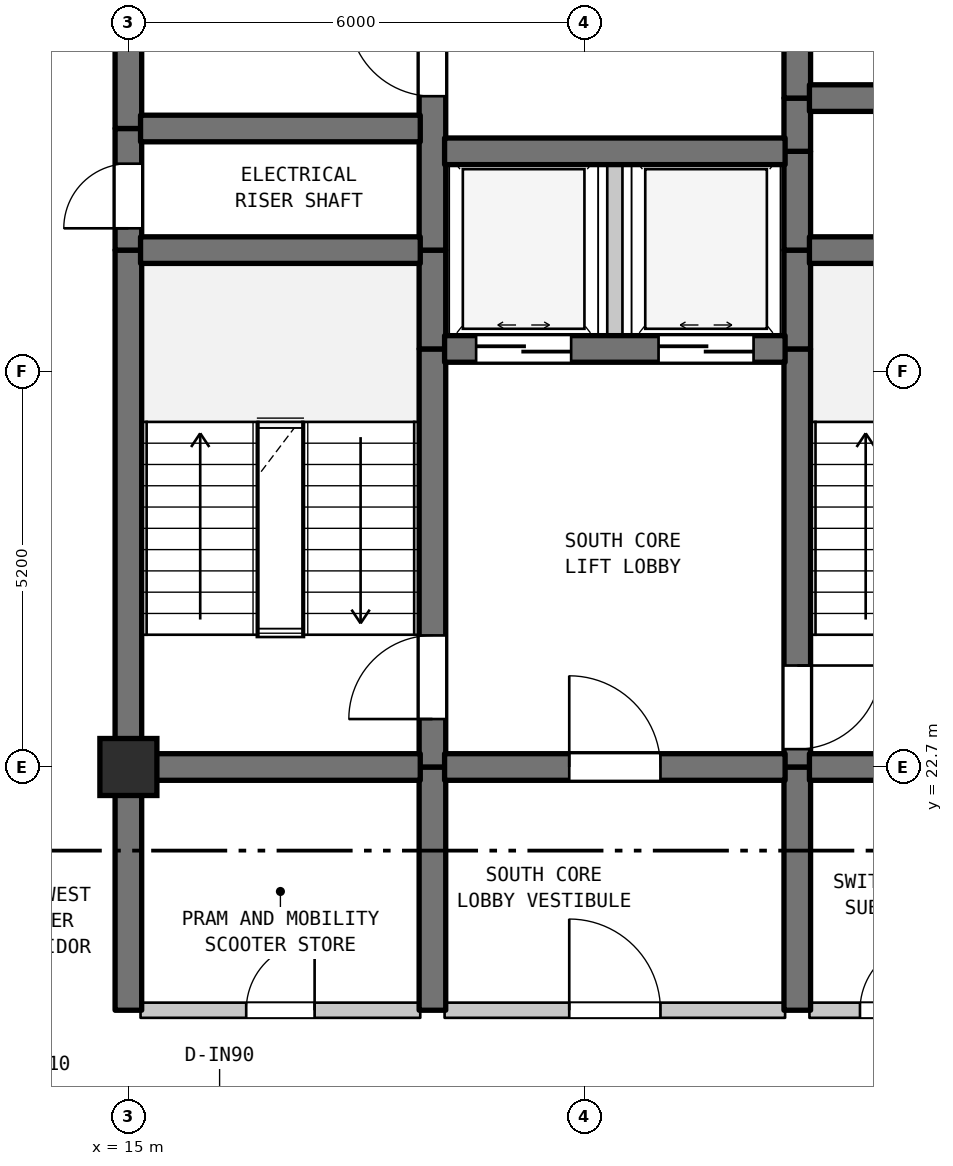
"""IFC4 building model, lengths in metres.
Left out: names, types, materials, properties, quantities, classifications, styles, units other than length and angle.
Written with IfcOpenShell. Run it as: python <this file> out.ifc"""

import sys

from ifc_helpers import new_model, si_unit, direction, frame, frame_2d, origin, origin_2d, place, context, subcontext, project, spatial, rectangle, extrude, element, fill, save


model = new_model("IFC4")
c1 = context("Model", 3, precision=1e-05, world=origin(), true_north=direction((0.0, 1.0)))
c2 = subcontext(c1, "Body", "Model", "MODEL_VIEW")
j1 = project(units=[si_unit("LENGTHUNIT", "METRE"), si_unit("PLANEANGLEUNIT", "RADIAN")], contexts=[c1])
p1 = place(None, origin())
s1 = spatial("IfcSite", under=j1, at=p1, CompositionType="ELEMENT")
p2 = place(p1, origin())
s2 = spatial("IfcBuilding", under=s1, at=p2, CompositionType="ELEMENT")
p3 = place(p2, frame((0.0, 0.0, 226.5)))
s3 = spatial("IfcBuildingStorey", under=s2, at=p3, CompositionType="ELEMENT", Elevation=226.5)
p4 = place(p3, frame((15.0, 22.7, 0.0), z_axis=(0.0, 0.0, 1.0), x_axis=(1.0, 0.0, 0.0)))
e1 = element("IfcColumn", 1, at=p4, inside=s3, PredefinedType="COLUMN", context=c2, shape_type="SweptSolid", body=[
    extrude(rectangle(XDim=0.75, YDim=0.75, at=origin_2d()), origin(), (0.0, 0.0, 1.0), 3.7),
])
p5 = place(p3, frame((15.0, 19.5, 0.0), z_axis=(0.0, 0.0, 1.0), x_axis=(0.0, 1.0, 0.0)))
e2 = element("IfcWall", 2, at=p5, inside=s3, PredefinedType="SHEAR", context=c2, shape_type="SweptSolid", body=[
    extrude(rectangle(XDim=3.2, YDim=0.35, at=frame_2d((1.6, 0.0))), origin(), (0.0, 0.0, 1.0), 3.39),
])
p6 = place(p3, frame((15.0, 22.7, 0.0), z_axis=(0.0, 0.0, 1.0), x_axis=(0.0, 1.0, 0.0)))
e3 = element("IfcWall", 3, at=p6, inside=s3, PredefinedType="SHEAR", context=c2, shape_type="SweptSolid", body=[
    extrude(rectangle(XDim=6.8, YDim=0.35, at=frame_2d((3.4, 0.0))), origin(), (0.0, 0.0, 1.0), 3.39),
])
p7 = place(p3, frame((15.0, 29.5, 0.0), z_axis=(0.0, 0.0, 1.0), x_axis=(0.0, 1.0, 0.0)))
e4 = element("IfcWall", 4, at=p7, inside=s3, PredefinedType="SHEAR", context=c2, shape_type="SweptSolid", body=[
    extrude(rectangle(XDim=1.6, YDim=0.35, at=frame_2d((0.8, 0.0))), origin(), (0.0, 0.0, 1.0), 3.39),
])
p8 = place(p7, frame((0.287, 0.0, 0.0)))
e5 = element("IfcOpeningElement", 5, at=p8, cuts=e4, PredefinedType="OPENING", context=c2, shape_type="SweptSolid", body=[
    extrude(rectangle(XDim=0.85, YDim=2.1, at=frame_2d((0.425, 1.05))), frame((0.0, 0.185, 0.0), z_axis=(0.0, -1.0, 0.0), x_axis=(1.0, 0.0, 0.0)), (0.0, 0.0, 1.0), 0.37),
])
p9 = place(p3, frame((15.0, 31.1, 0.0), z_axis=(0.0, 0.0, 1.0), x_axis=(0.0, 1.0, 0.0)))
e6 = element("IfcWall", 6, at=p9, inside=s3, PredefinedType="SHEAR", context=c2, shape_type="SweptSolid", body=[
    extrude(rectangle(XDim=6.8, YDim=0.35, at=frame_2d((3.4, 0.0))), origin(), (0.0, 0.0, 1.0), 3.39),
])
p10 = place(p3, frame((19.0, 19.5, 0.0), z_axis=(0.0, 0.0, 1.0), x_axis=(0.0, 1.0, 0.0)))
e7 = element("IfcWall", 7, at=p10, inside=s3, PredefinedType="SHEAR", context=c2, shape_type="SweptSolid", body=[
    extrude(rectangle(XDim=3.2, YDim=0.35, at=frame_2d((1.6, 0.0))), origin(), (0.0, 0.0, 1.0), 3.39),
])
p11 = place(p3, frame((19.0, 22.7, 0.0), z_axis=(0.0, 0.0, 1.0), x_axis=(0.0, 1.0, 0.0)))
e8 = element("IfcWall", 8, at=p11, inside=s3, PredefinedType="SHEAR", context=c2, shape_type="SweptSolid", body=[
    extrude(rectangle(XDim=5.5, YDim=0.35, at=frame_2d((2.75, 0.0))), origin(), (0.0, 0.0, 1.0), 3.39),
])
p12 = place(p11, frame((0.631, 0.0, 0.0)))
e9 = element("IfcOpeningElement", 9, at=p12, cuts=e8, PredefinedType="OPENING", context=c2, shape_type="SweptSolid", body=[
    extrude(rectangle(XDim=1.1, YDim=2.15, at=frame_2d((0.55, 1.075))), frame((0.0, 0.185, 0.0), z_axis=(0.0, -1.0, 0.0), x_axis=(1.0, 0.0, 0.0)), (0.0, 0.0, 1.0), 0.37),
])
p13 = place(p3, frame((19.0, 28.2, 0.0), z_axis=(0.0, 0.0, 1.0), x_axis=(0.0, 1.0, 0.0)))
e10 = element("IfcWall", 10, at=p13, inside=s3, PredefinedType="SHEAR", context=c2, shape_type="SweptSolid", body=[
    extrude(rectangle(XDim=1.3, YDim=0.35, at=frame_2d((0.65, 0.0))), origin(), (0.0, 0.0, 1.0), 3.39),
])
p14 = place(p3, frame((19.0, 29.5, 0.0), z_axis=(0.0, 0.0, 1.0), x_axis=(0.0, 1.0, 0.0)))
e11 = element("IfcWall", 11, at=p14, inside=s3, PredefinedType="SHEAR", context=c2, shape_type="SweptSolid", body=[
    extrude(rectangle(XDim=5.5, YDim=0.35, at=frame_2d((2.75, 0.0))), origin(), (0.0, 0.0, 1.0), 3.39),
])
p15 = place(p14, frame((2.025, 0.0, 0.0)))
e12 = element("IfcOpeningElement", 12, at=p15, cuts=e11, PredefinedType="OPENING", context=c2, shape_type="SweptSolid", body=[
    extrude(rectangle(XDim=1.1, YDim=2.15, at=frame_2d((0.55, 1.075))), frame((0.0, 0.185, 0.0), z_axis=(0.0, -1.0, 0.0), x_axis=(1.0, 0.0, 0.0)), (0.0, 0.0, 1.0), 0.37),
])
p16 = place(p3, frame((21.4, 28.2, 0.0), z_axis=(0.0, 0.0, 1.0), x_axis=(0.0, 1.0, 0.0)))
e13 = element("IfcWall", 13, at=p16, inside=s3, PredefinedType="STANDARD", context=c2, shape_type="SweptSolid", body=[
    extrude(rectangle(XDim=2.6, YDim=0.2, at=frame_2d((1.3, 0.0))), origin(), (0.0, 0.0, 1.0), 3.39),
])
p17 = place(p3, frame((23.8, 19.5, 0.0), z_axis=(0.0, 0.0, 1.0), x_axis=(0.0, 1.0, 0.0)))
e14 = element("IfcWall", 14, at=p17, inside=s3, PredefinedType="SHEAR", context=c2, shape_type="SweptSolid", body=[
    extrude(rectangle(XDim=3.2, YDim=0.35, at=frame_2d((1.6, 0.0))), origin(), (0.0, 0.0, 1.0), 3.39),
])
p18 = place(p3, frame((23.8, 22.7, 0.0), z_axis=(0.0, 0.0, 1.0), x_axis=(0.0, 1.0, 0.0)))
e15 = element("IfcWall", 15, at=p18, inside=s3, PredefinedType="SHEAR", context=c2, shape_type="SweptSolid", body=[
    extrude(rectangle(XDim=5.5, YDim=0.35, at=frame_2d((2.75, 0.0))), origin(), (0.0, 0.0, 1.0), 3.39),
])
p19 = place(p18, frame((0.235, 0.0, 0.0)))
e16 = element("IfcOpeningElement", 16, at=p19, cuts=e15, PredefinedType="OPENING", context=c2, shape_type="SweptSolid", body=[
    extrude(rectangle(XDim=1.1, YDim=2.15, at=frame_2d((0.55, 1.075))), frame((0.0, 0.185, 0.0), z_axis=(0.0, -1.0, 0.0), x_axis=(1.0, 0.0, 0.0)), (0.0, 0.0, 1.0), 0.37),
])
for number, where, z_axis, x_axis in (
    (17, (23.8, 28.2, 0.0), (0.0, 0.0, 1.0), (0.0, 1.0, 0.0)),
    (18, (23.8, 29.5, 0.0), (0.0, 0.0, 1.0), (0.0, 1.0, 0.0)),
):
    element("IfcWall", number, at=place(p3, frame(where, z_axis=z_axis, x_axis=x_axis)), inside=s3, PredefinedType="SHEAR", context=c2, shape_type="SweptSolid", body=[
        extrude(rectangle(XDim=1.3, YDim=0.35, at=frame_2d((0.65, 0.0))), origin(), (0.0, 0.0, 1.0), 3.39),
    ])
p20 = place(p3, frame((23.8, 30.8, 0.0), z_axis=(0.0, 0.0, 1.0), x_axis=(0.0, 1.0, 0.0)))
e19 = element("IfcWall", 19, at=p20, inside=s3, PredefinedType="SHEAR", context=c2, shape_type="SweptSolid", body=[
    extrude(rectangle(XDim=0.7, YDim=0.35, at=frame_2d((0.35, 0.0))), origin(), (0.0, 0.0, 1.0), 3.39),
])
p21 = place(p3, frame((23.8, 31.5, 0.0), z_axis=(0.0, 0.0, 1.0), x_axis=(0.0, 1.0, 0.0)))
e20 = element("IfcWall", 20, at=p21, inside=s3, PredefinedType="SHEAR", context=c2, shape_type="SweptSolid", body=[
    extrude(rectangle(XDim=3.5, YDim=0.35, at=frame_2d((1.75, 0.0))), origin(), (0.0, 0.0, 1.0), 3.39),
])
p22 = place(p21, frame((1.127, 0.0, 0.0)))
e21 = element("IfcOpeningElement", 21, at=p22, cuts=e20, PredefinedType="OPENING", context=c2, shape_type="SweptSolid", body=[
    extrude(rectangle(XDim=1.1, YDim=2.15, at=frame_2d((0.55, 1.075))), frame((0.0, 0.185, 0.0), z_axis=(0.0, -1.0, 0.0), x_axis=(1.0, 0.0, 0.0)), (0.0, 0.0, 1.0), 0.37),
])
p23 = place(p3, frame((15.16, 19.5, 0.0), z_axis=(0.0, 0.0, 1.0), x_axis=(1.0, 0.0, 0.0)))
e22 = element("IfcWall", 22, at=p23, inside=s3, PredefinedType="STANDARD", context=c2, shape_type="SweptSolid", body=[
    extrude(rectangle(XDim=3.68, YDim=0.2, at=frame_2d((1.84, 0.0))), origin(), (0.0, 0.0, 1.0), 3.39),
])
p24 = place(p23, frame((1.39, 0.0, 0.0)))
e23 = element("IfcOpeningElement", 23, at=p24, cuts=e22, PredefinedType="OPENING", context=c2, shape_type="SweptSolid", body=[
    extrude(rectangle(XDim=0.9, YDim=2.15, at=frame_2d((0.45, 1.075))), frame((0.0, 0.11, 0.0), z_axis=(0.0, -1.0, 0.0), x_axis=(1.0, 0.0, 0.0)), (0.0, 0.0, 1.0), 0.22),
])
p25 = place(p3, frame((19.16, 19.5, 0.0), z_axis=(0.0, 0.0, 1.0), x_axis=(1.0, 0.0, 0.0)))
e24 = element("IfcWall", 24, at=p25, inside=s3, PredefinedType="STANDARD", context=c2, shape_type="SweptSolid", body=[
    extrude(rectangle(XDim=4.48, YDim=0.2, at=frame_2d((2.24, 0.0))), origin(), (0.0, 0.0, 1.0), 3.39),
])
p26 = place(p25, frame((1.64, 0.0, 0.0)))
e25 = element("IfcOpeningElement", 25, at=p26, cuts=e24, PredefinedType="OPENING", context=c2, shape_type="SweptSolid", body=[
    extrude(rectangle(XDim=1.2, YDim=2.2, at=frame_2d((0.6, 1.1))), frame((0.0, 0.11, 0.0), z_axis=(0.0, -1.0, 0.0), x_axis=(1.0, 0.0, 0.0)), (0.0, 0.0, 1.0), 0.22),
])
p27 = place(p3, frame((23.96, 19.5, 0.0), z_axis=(0.0, 0.0, 1.0), x_axis=(1.0, 0.0, 0.0)))
e26 = element("IfcWall", 26, at=p27, inside=s3, PredefinedType="STANDARD", context=c2, shape_type="SweptSolid", body=[
    extrude(rectangle(XDim=4.455, YDim=0.2, at=frame_2d((2.228, 0.0))), origin(), (0.0, 0.0, 1.0), 3.39),
])
p28 = place(p27, frame((0.665, 0.0, 0.0)))
e27 = element("IfcOpeningElement", 27, at=p28, cuts=e26, PredefinedType="OPENING", context=c2, shape_type="SweptSolid", body=[
    extrude(rectangle(XDim=0.9, YDim=2.15, at=frame_2d((0.45, 1.075))), frame((0.0, 0.11, 0.0), z_axis=(0.0, -1.0, 0.0), x_axis=(1.0, 0.0, 0.0)), (0.0, 0.0, 1.0), 0.22),
])
p29 = place(p27, frame((2.791, 0.0, 0.0)))
e28 = element("IfcOpeningElement", 28, at=p29, cuts=e26, PredefinedType="OPENING", context=c2, shape_type="SweptSolid", body=[
    extrude(rectangle(XDim=0.9, YDim=2.15, at=frame_2d((0.45, 1.075))), frame((0.0, 0.11, 0.0), z_axis=(0.0, -1.0, 0.0), x_axis=(1.0, 0.0, 0.0)), (0.0, 0.0, 1.0), 0.22),
])
p30 = place(p3, frame((15.16, 22.7, 0.0), z_axis=(0.0, 0.0, 1.0), x_axis=(1.0, 0.0, 0.0)))
e29 = element("IfcWall", 29, at=p30, inside=s3, PredefinedType="SHEAR", context=c2, shape_type="SweptSolid", body=[
    extrude(rectangle(XDim=3.68, YDim=0.35, at=frame_2d((1.84, 0.0))), origin(), (0.0, 0.0, 1.0), 3.39),
])
p31 = place(p3, frame((19.16, 22.7, 0.0), z_axis=(0.0, 0.0, 1.0), x_axis=(1.0, 0.0, 0.0)))
e30 = element("IfcWall", 30, at=p31, inside=s3, PredefinedType="SHEAR", context=c2, shape_type="SweptSolid", body=[
    extrude(rectangle(XDim=4.48, YDim=0.35, at=frame_2d((2.24, 0.0))), origin(), (0.0, 0.0, 1.0), 3.39),
])
p32 = place(p31, frame((1.64, 0.0, 0.0)))
e31 = element("IfcOpeningElement", 31, at=p32, cuts=e30, PredefinedType="OPENING", context=c2, shape_type="SweptSolid", body=[
    extrude(rectangle(XDim=1.2, YDim=2.2, at=frame_2d((0.6, 1.1))), frame((0.0, 0.185, 0.0), z_axis=(0.0, -1.0, 0.0), x_axis=(1.0, 0.0, 0.0)), (0.0, 0.0, 1.0), 0.37),
])
p33 = place(p3, frame((23.96, 22.7, 0.0), z_axis=(0.0, 0.0, 1.0), x_axis=(1.0, 0.0, 0.0)))
e32 = element("IfcWall", 32, at=p33, inside=s3, PredefinedType="SHEAR", context=c2, shape_type="SweptSolid", body=[
    extrude(rectangle(XDim=3.18, YDim=0.35, at=frame_2d((1.59, 0.0))), origin(), (0.0, 0.0, 1.0), 3.39),
])
p34 = place(p3, frame((19.16, 28.2, 0.0), z_axis=(0.0, 0.0, 1.0), x_axis=(1.0, 0.0, 0.0)))
e33 = element("IfcWall", 33, at=p34, inside=s3, PredefinedType="SHEAR", context=c2, shape_type="SweptSolid", body=[
    extrude(rectangle(XDim=4.48, YDim=0.35, at=frame_2d((2.24, 0.0))), origin(), (0.0, 0.0, 1.0), 3.39),
])
p35 = place(p34, frame((0.415, 0.0, 0.0)))
e34 = element("IfcOpeningElement", 34, at=p35, cuts=e33, PredefinedType="OPENING", context=c2, shape_type="SweptSolid", body=[
    extrude(rectangle(XDim=1.25, YDim=2.2, at=frame_2d((0.625, 1.1))), frame((0.0, 0.185, 0.0), z_axis=(0.0, -1.0, 0.0), x_axis=(1.0, 0.0, 0.0)), (0.0, 0.0, 1.0), 0.37),
])
p36 = place(p34, frame((2.815, 0.0, 0.0)))
e35 = element("IfcOpeningElement", 35, at=p36, cuts=e33, PredefinedType="OPENING", context=c2, shape_type="SweptSolid", body=[
    extrude(rectangle(XDim=1.25, YDim=2.2, at=frame_2d((0.625, 1.1))), frame((0.0, 0.185, 0.0), z_axis=(0.0, -1.0, 0.0), x_axis=(1.0, 0.0, 0.0)), (0.0, 0.0, 1.0), 0.37),
])
p37 = place(p3, frame((15.16, 29.5, 0.0), z_axis=(0.0, 0.0, 1.0), x_axis=(1.0, 0.0, 0.0)))
e36 = element("IfcWall", 36, at=p37, inside=s3, PredefinedType="SHEAR", context=c2, shape_type="SweptSolid", body=[
    extrude(rectangle(XDim=3.68, YDim=0.35, at=frame_2d((1.84, 0.0))), origin(), (0.0, 0.0, 1.0), 3.39),
])
p38 = place(p3, frame((23.96, 29.5, 0.0), z_axis=(0.0, 0.0, 1.0), x_axis=(1.0, 0.0, 0.0)))
e37 = element("IfcWall", 37, at=p38, inside=s3, PredefinedType="SHEAR", context=c2, shape_type="SweptSolid", body=[
    extrude(rectangle(XDim=3.18, YDim=0.35, at=frame_2d((1.59, 0.0))), origin(), (0.0, 0.0, 1.0), 3.39),
])
p39 = place(p3, frame((19.16, 30.8, 0.0), z_axis=(0.0, 0.0, 1.0), x_axis=(1.0, 0.0, 0.0)))
e38 = element("IfcWall", 38, at=p39, inside=s3, PredefinedType="SHEAR", context=c2, shape_type="SweptSolid", body=[
    extrude(rectangle(XDim=4.48, YDim=0.35, at=frame_2d((2.24, 0.0))), origin(), (0.0, 0.0, 1.0), 3.39),
])
p40 = place(p3, frame((15.16, 31.1, 0.0), z_axis=(0.0, 0.0, 1.0), x_axis=(1.0, 0.0, 0.0)))
e39 = element("IfcWall", 39, at=p40, inside=s3, PredefinedType="SHEAR", context=c2, shape_type="SweptSolid", body=[
    extrude(rectangle(XDim=3.68, YDim=0.35, at=frame_2d((1.84, 0.0))), origin(), (0.0, 0.0, 1.0), 3.39),
])
p41 = place(p3, frame((23.96, 31.5, 0.0), z_axis=(0.0, 0.0, 1.0), x_axis=(1.0, 0.0, 0.0)))
e40 = element("IfcWall", 40, at=p41, inside=s3, PredefinedType="SHEAR", context=c2, shape_type="SweptSolid", body=[
    extrude(rectangle(XDim=3.18, YDim=0.35, at=frame_2d((1.59, 0.0))), origin(), (0.0, 0.0, 1.0), 3.39),
])
p42 = place(p41, frame((1.094, 0.0, 0.0)))
e41 = element("IfcOpeningElement", 41, at=p42, cuts=e40, PredefinedType="OPENING", context=c2, shape_type="SweptSolid", body=[
    extrude(rectangle(XDim=0.85, YDim=2.1, at=frame_2d((0.425, 1.05))), frame((0.0, 0.185, 0.0), z_axis=(0.0, -1.0, 0.0), x_axis=(1.0, 0.0, 0.0)), (0.0, 0.0, 1.0), 0.37),
])
p43 = place(p8, origin())
e42 = element("IfcDoor", 42, at=p43, inside=s3, OperationType="SINGLE_SWING_LEFT", PredefinedType="DOOR", context=c2, shape_type="SweptSolid", body=[
    extrude(rectangle(XDim=0.85, YDim=2.1, at=frame_2d((0.425, 1.05))), frame((0.0, 0.025, 0.0), z_axis=(0.0, -1.0, 0.0), x_axis=(1.0, 0.0, 0.0)), (0.0, 0.0, 1.0), 0.05),
])
fill(e5, e42)
p44 = place(p12, origin())
e43 = element("IfcDoor", 43, at=p44, inside=s3, OperationType="SINGLE_SWING_LEFT", PredefinedType="DOOR", context=c2, shape_type="SweptSolid", body=[
    extrude(rectangle(XDim=1.1, YDim=2.15, at=frame_2d((0.55, 1.075))), frame((0.0, 0.025, 0.0), z_axis=(0.0, -1.0, 0.0), x_axis=(1.0, 0.0, 0.0)), (0.0, 0.0, 1.0), 0.05),
])
fill(e9, e43)
p45 = place(p15, origin())
e44 = element("IfcDoor", 44, at=p45, inside=s3, OperationType="SINGLE_SWING_RIGHT", PredefinedType="DOOR", context=c2, shape_type="SweptSolid", body=[
    extrude(rectangle(XDim=1.1, YDim=2.15, at=frame_2d((0.55, 1.075))), frame((0.0, 0.025, 0.0), z_axis=(0.0, -1.0, 0.0), x_axis=(1.0, 0.0, 0.0)), (0.0, 0.0, 1.0), 0.05),
])
fill(e12, e44)
p46 = place(p19, frame((1.1, 0.0, 0.0), z_axis=(0.0, 0.0, 1.0), x_axis=(-1.0, 0.0, 0.0)))
e45 = element("IfcDoor", 45, at=p46, inside=s3, OperationType="SINGLE_SWING_RIGHT", PredefinedType="DOOR", context=c2, shape_type="SweptSolid", body=[
    extrude(rectangle(XDim=1.1, YDim=2.15, at=frame_2d((0.55, 1.075))), frame((0.0, 0.025, 0.0), z_axis=(0.0, -1.0, 0.0), x_axis=(1.0, 0.0, 0.0)), (0.0, 0.0, 1.0), 0.05),
])
fill(e16, e45)
p47 = place(p24, origin())
e46 = element("IfcDoor", 46, at=p47, inside=s3, OperationType="SINGLE_SWING_RIGHT", PredefinedType="DOOR", context=c2, shape_type="SweptSolid", body=[
    extrude(rectangle(XDim=0.9, YDim=2.15, at=frame_2d((0.45, 1.075))), frame((0.0, 0.025, 0.0), z_axis=(0.0, -1.0, 0.0), x_axis=(1.0, 0.0, 0.0)), (0.0, 0.0, 1.0), 0.05),
])
fill(e23, e46)
p48 = place(p26, origin())
e47 = element("IfcDoor", 47, at=p48, inside=s3, OperationType="SINGLE_SWING_LEFT", PredefinedType="DOOR", context=c2, shape_type="SweptSolid", body=[
    extrude(rectangle(XDim=1.2, YDim=2.2, at=frame_2d((0.6, 1.1))), frame((0.0, 0.025, 0.0), z_axis=(0.0, -1.0, 0.0), x_axis=(1.0, 0.0, 0.0)), (0.0, 0.0, 1.0), 0.05),
])
fill(e25, e47)
p49 = place(p28, origin())
e48 = element("IfcDoor", 48, at=p49, inside=s3, OperationType="SINGLE_SWING_RIGHT", PredefinedType="DOOR", context=c2, shape_type="SweptSolid", body=[
    extrude(rectangle(XDim=0.9, YDim=2.15, at=frame_2d((0.45, 1.075))), frame((0.0, 0.025, 0.0), z_axis=(0.0, -1.0, 0.0), x_axis=(1.0, 0.0, 0.0)), (0.0, 0.0, 1.0), 0.05),
])
fill(e27, e48)
p50 = place(p32, origin())
e49 = element("IfcDoor", 49, at=p50, inside=s3, OperationType="SINGLE_SWING_LEFT", PredefinedType="DOOR", context=c2, shape_type="SweptSolid", body=[
    extrude(rectangle(XDim=1.2, YDim=2.2, at=frame_2d((0.6, 1.1))), frame((0.0, 0.025, 0.0), z_axis=(0.0, -1.0, 0.0), x_axis=(1.0, 0.0, 0.0)), (0.0, 0.0, 1.0), 0.05),
])
fill(e31, e49)
p51 = place(p35, origin())
e50 = element("IfcDoor", 50, at=p51, inside=s3, OperationType="DOUBLE_DOOR_SLIDING", PredefinedType="DOOR", context=c2, shape_type="SweptSolid", body=[
    extrude(rectangle(XDim=1.25, YDim=2.2, at=frame_2d((0.625, 1.1))), frame((0.0, 0.025, 0.0), z_axis=(0.0, -1.0, 0.0), x_axis=(1.0, 0.0, 0.0)), (0.0, 0.0, 1.0), 0.05),
])
fill(e34, e50)
p52 = place(p36, origin())
e51 = element("IfcDoor", 51, at=p52, inside=s3, OperationType="DOUBLE_DOOR_SLIDING", PredefinedType="DOOR", context=c2, shape_type="SweptSolid", body=[
    extrude(rectangle(XDim=1.25, YDim=2.2, at=frame_2d((0.625, 1.1))), frame((0.0, 0.025, 0.0), z_axis=(0.0, -1.0, 0.0), x_axis=(1.0, 0.0, 0.0)), (0.0, 0.0, 1.0), 0.05),
])
fill(e35, e51)
save(model, sys.argv[1])
